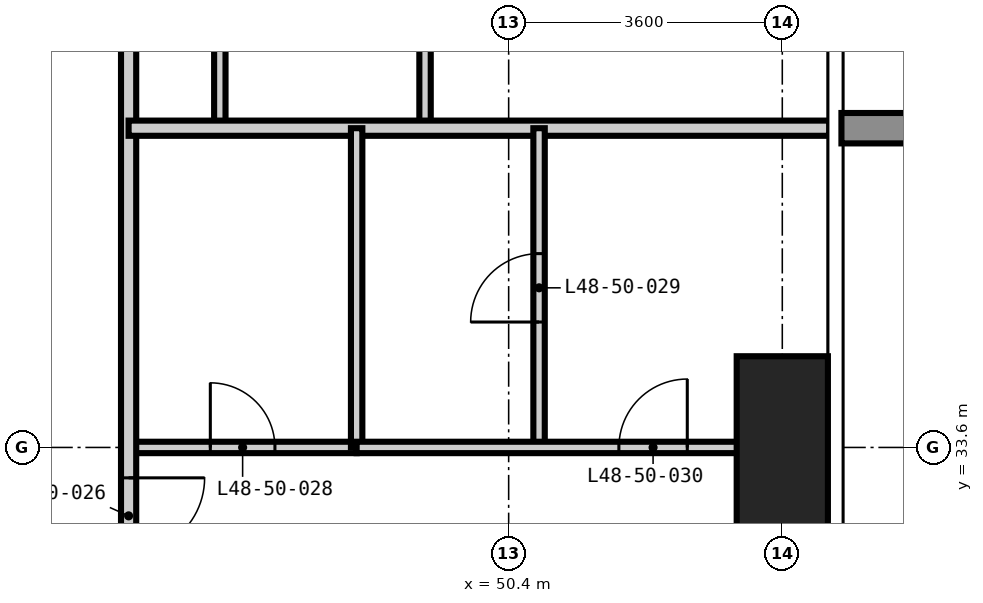
"""IFC4 building model, lengths in metres.
Left out: names, types, materials, properties, quantities, classifications, styles, units other than length and angle.
Written with IfcOpenShell. Run it as: python <this file> out.ifc"""

import sys

from ifc_helpers import new_model, si_unit, direction, frame, frame_2d, origin, origin_2d, place, context, subcontext, project, spatial, rectangle, extrude, element, fill, save


model = new_model("IFC4")
c1 = context("Model", 3, precision=1e-05, world=origin(), true_north=direction((0.0, 1.0)))
c2 = subcontext(c1, "Body", "Model", "MODEL_VIEW")
j1 = project(units=[si_unit("LENGTHUNIT", "METRE"), si_unit("PLANEANGLEUNIT", "RADIAN")], contexts=[c1])
p1 = place(None, origin())
s1 = spatial("IfcSite", under=j1, at=p1, CompositionType="ELEMENT")
p2 = place(p1, origin())
s2 = spatial("IfcBuilding", under=s1, at=p2, CompositionType="ELEMENT")
p3 = place(p2, frame((0.0, 0.0, 187.8)))
s3 = spatial("IfcBuildingStorey", under=s2, at=p3, CompositionType="ELEMENT", Elevation=187.8)
p4 = place(p3, frame((54.0, 33.6, -0.35), z_axis=(0.0, 0.0, 1.0), x_axis=(1.0, 0.0, 0.0)))
e1 = element("IfcColumn", 1, at=p4, inside=s3, PredefinedType="COLUMN", context=c2, shape_type="SweptSolid", body=[
    extrude(rectangle(XDim=1.2, YDim=2.4, at=origin_2d()), origin(), (0.0, 0.0, 1.0), 3.6),
])
p5 = place(p3, frame((46.6, 37.8, 0.0), z_axis=(0.0, 0.0, 1.0), x_axis=(0.0, 1.0, 0.0)))
e2 = element("IfcWall", 2, at=p5, inside=s3, PredefinedType="PARTITIONING", context=c2, shape_type="SweptSolid", body=[
    extrude(rectangle(XDim=3.0, YDim=0.15, at=frame_2d((1.5, 0.0))), origin(), (0.0, 0.0, 1.0), 3.25),
])
p6 = place(p3, frame((49.3, 37.8, 0.0), z_axis=(0.0, 0.0, 1.0), x_axis=(0.0, 1.0, 0.0)))
e3 = element("IfcWall", 3, at=p6, inside=s3, PredefinedType="PARTITIONING", context=c2, shape_type="SweptSolid", body=[
    extrude(rectangle(XDim=3.0, YDim=0.15, at=frame_2d((1.5, 0.0))), origin(), (0.0, 0.0, 1.0), 3.25),
])
p7 = place(p6, frame((1.075, 0.0, 0.0)))
e4 = element("IfcOpeningElement", 4, at=p7, cuts=e3, PredefinedType="OPENING", context=c2, shape_type="SweptSolid", body=[
    extrude(rectangle(XDim=0.85, YDim=2.1, at=frame_2d((0.425, 1.05))), frame((0.0, 0.085, 0.0), z_axis=(0.0, -1.0, 0.0), x_axis=(1.0, 0.0, 0.0)), (0.0, 0.0, 1.0), 0.17),
])
p8 = place(p3, frame((45.4, 33.6, 0.0), z_axis=(0.0, 0.0, 1.0), x_axis=(1.0, 0.0, 0.0)))
e5 = element("IfcWall", 5, at=p8, inside=s3, PredefinedType="PARTITIONING", context=c2, shape_type="SweptSolid", body=[
    extrude(rectangle(XDim=3.0, YDim=0.15, at=frame_2d((1.5, 0.0))), origin(), (0.0, 0.0, 1.0), 3.25),
])
p9 = place(p8, frame((1.075, 0.0, 0.0)))
e6 = element("IfcOpeningElement", 6, at=p9, cuts=e5, PredefinedType="OPENING", context=c2, shape_type="SweptSolid", body=[
    extrude(rectangle(XDim=0.85, YDim=2.1, at=frame_2d((0.425, 1.05))), frame((0.0, 0.085, 0.0), z_axis=(0.0, -1.0, 0.0), x_axis=(1.0, 0.0, 0.0)), (0.0, 0.0, 1.0), 0.17),
])
p10 = place(p3, frame((45.4, 44.2, 0.0), z_axis=(0.0, 0.0, 1.0), x_axis=(0.0, -1.0, 0.0)))
e7 = element("IfcWall", 7, at=p10, inside=s3, PredefinedType="PARTITIONING", context=c2, shape_type="SweptSolid", body=[
    extrude(rectangle(XDim=30.2, YDim=0.2, at=frame_2d((15.1, 0.0))), origin(), (0.0, 0.0, 1.0), 3.25),
])
p11 = place(p10, frame((21.8, 0.0, 0.0)))
e8 = element("IfcOpeningElement", 8, at=p11, cuts=e7, PredefinedType="OPENING", context=c2, shape_type="SweptSolid", body=[
    extrude(rectangle(XDim=1.0, YDim=2.2, at=frame_2d((0.5, 1.1))), frame((0.0, 0.11, 0.0), z_axis=(0.0, -1.0, 0.0), x_axis=(1.0, 0.0, 0.0)), (0.0, 0.0, 1.0), 0.22),
])
p12 = place(p10, frame((11.0, 0.0, 0.0)))
e9 = element("IfcOpeningElement", 9, at=p12, cuts=e7, PredefinedType="OPENING", context=c2, shape_type="SweptSolid", body=[
    extrude(rectangle(XDim=1.0, YDim=2.2, at=frame_2d((0.5, 1.1))), frame((0.0, 0.11, 0.0), z_axis=(0.0, -1.0, 0.0), x_axis=(1.0, 0.0, 0.0)), (0.0, 0.0, 1.0), 0.22),
])
p13 = place(p10, frame((3.8, 0.0, 0.0)))
e10 = element("IfcOpeningElement", 10, at=p13, cuts=e7, PredefinedType="OPENING", context=c2, shape_type="SweptSolid", body=[
    extrude(rectangle(XDim=1.0, YDim=2.2, at=frame_2d((0.5, 1.1))), frame((0.0, 0.11, 0.0), z_axis=(0.0, -1.0, 0.0), x_axis=(1.0, 0.0, 0.0)), (0.0, 0.0, 1.0), 0.22),
])
p14 = place(p10, frame((28.3, 0.0, 0.0)))
e11 = element("IfcOpeningElement", 11, at=p14, cuts=e7, PredefinedType="OPENING", context=c2, shape_type="SweptSolid", body=[
    extrude(rectangle(XDim=1.0, YDim=2.2, at=frame_2d((0.5, 1.1))), frame((0.0, 0.11, 0.0), z_axis=(0.0, -1.0, 0.0), x_axis=(1.0, 0.0, 0.0)), (0.0, 0.0, 1.0), 0.22),
])
p15 = place(p10, frame((0.6, 0.0, 0.0)))
e12 = element("IfcOpeningElement", 12, at=p15, cuts=e7, PredefinedType="OPENING", context=c2, shape_type="SweptSolid", body=[
    extrude(rectangle(XDim=1.0, YDim=2.2, at=frame_2d((0.5, 1.1))), frame((0.0, 0.11, 0.0), z_axis=(0.0, -1.0, 0.0), x_axis=(1.0, 0.0, 0.0)), (0.0, 0.0, 1.0), 0.22),
])
p16 = place(p3, frame((45.4, 37.8, 0.0), z_axis=(0.0, 0.0, 1.0), x_axis=(1.0, 0.0, 0.0)))
e13 = element("IfcWall", 13, at=p16, inside=s3, PredefinedType="PARTITIONING", context=c2, shape_type="SweptSolid", body=[
    extrude(rectangle(XDim=9.218, YDim=0.2, at=frame_2d((4.609, 0.0))), origin(), (0.0, 0.0, 1.0), 3.25),
])
p17 = place(p3, frame((48.4, 33.6, 0.0), z_axis=(0.0, 0.0, 1.0), x_axis=(0.0, 1.0, 0.0)))
e14 = element("IfcWall", 14, at=p17, inside=s3, PredefinedType="PARTITIONING", context=c2, shape_type="SweptSolid", body=[
    extrude(rectangle(XDim=4.2, YDim=0.15, at=frame_2d((2.1, 0.0))), origin(), (0.0, 0.0, 1.0), 3.25),
])
p18 = place(p3, frame((50.8, 33.6, 0.0), z_axis=(0.0, 0.0, 1.0), x_axis=(0.0, 1.0, 0.0)))
e15 = element("IfcWall", 15, at=p18, inside=s3, PredefinedType="PARTITIONING", context=c2, shape_type="SweptSolid", body=[
    extrude(rectangle(XDim=4.2, YDim=0.15, at=frame_2d((2.1, 0.0))), origin(), (0.0, 0.0, 1.0), 3.25),
])
p19 = place(p18, frame((1.65, 0.0, 0.0)))
e16 = element("IfcOpeningElement", 16, at=p19, cuts=e15, PredefinedType="OPENING", context=c2, shape_type="SweptSolid", body=[
    extrude(rectangle(XDim=0.9, YDim=2.1, at=frame_2d((0.45, 1.05))), frame((0.0, 0.085, 0.0), z_axis=(0.0, -1.0, 0.0), x_axis=(1.0, 0.0, 0.0)), (0.0, 0.0, 1.0), 0.17),
])
p20 = place(p3, frame((48.4, 33.6, 0.0), z_axis=(0.0, 0.0, 1.0), x_axis=(1.0, 0.0, 0.0)))
e17 = element("IfcWall", 17, at=p20, inside=s3, PredefinedType="PARTITIONING", context=c2, shape_type="SweptSolid", body=[
    extrude(rectangle(XDim=6.218, YDim=0.15, at=frame_2d((3.109, 0.0))), origin(), (0.0, 0.0, 1.0), 3.25),
])
p21 = place(p20, frame((3.45, 0.0, 0.0)))
e18 = element("IfcOpeningElement", 18, at=p21, cuts=e17, PredefinedType="OPENING", context=c2, shape_type="SweptSolid", body=[
    extrude(rectangle(XDim=0.9, YDim=2.1, at=frame_2d((0.45, 1.05))), frame((0.0, 0.085, 0.0), z_axis=(0.0, -1.0, 0.0), x_axis=(1.0, 0.0, 0.0)), (0.0, 0.0, 1.0), 0.17),
])
p22 = place(p12, origin())
e19 = element("IfcDoor", 19, at=p22, inside=s3, OperationType="SINGLE_SWING_LEFT", PredefinedType="DOOR", context=c2, shape_type="SweptSolid", body=[
    extrude(rectangle(XDim=1.0, YDim=2.2, at=frame_2d((0.5, 1.1))), frame((0.0, 0.025, 0.0), z_axis=(0.0, -1.0, 0.0), x_axis=(1.0, 0.0, 0.0)), (0.0, 0.0, 1.0), 0.05),
])
fill(e9, e19)
p23 = place(p9, origin())
e20 = element("IfcDoor", 20, at=p23, inside=s3, OperationType="SINGLE_SWING_LEFT", PredefinedType="DOOR", context=c2, shape_type="SweptSolid", body=[
    extrude(rectangle(XDim=0.85, YDim=2.1, at=frame_2d((0.425, 1.05))), frame((0.0, 0.025, 0.0), z_axis=(0.0, -1.0, 0.0), x_axis=(1.0, 0.0, 0.0)), (0.0, 0.0, 1.0), 0.05),
])
fill(e6, e20)
p24 = place(p19, origin())
e21 = element("IfcDoor", 21, at=p24, inside=s3, OperationType="SINGLE_SWING_LEFT", PredefinedType="DOOR", context=c2, shape_type="SweptSolid", body=[
    extrude(rectangle(XDim=0.9, YDim=2.1, at=frame_2d((0.45, 1.05))), frame((0.0, 0.025, 0.0), z_axis=(0.0, -1.0, 0.0), x_axis=(1.0, 0.0, 0.0)), (0.0, 0.0, 1.0), 0.05),
])
fill(e16, e21)
p25 = place(p21, origin())
e22 = element("IfcDoor", 22, at=p25, inside=s3, OperationType="SINGLE_SWING_RIGHT", PredefinedType="DOOR", context=c2, shape_type="SweptSolid", body=[
    extrude(rectangle(XDim=0.9, YDim=2.1, at=frame_2d((0.45, 1.05))), frame((0.0, 0.025, 0.0), z_axis=(0.0, -1.0, 0.0), x_axis=(1.0, 0.0, 0.0)), (0.0, 0.0, 1.0), 0.05),
])
fill(e18, e22)
save(model, sys.argv[1])
